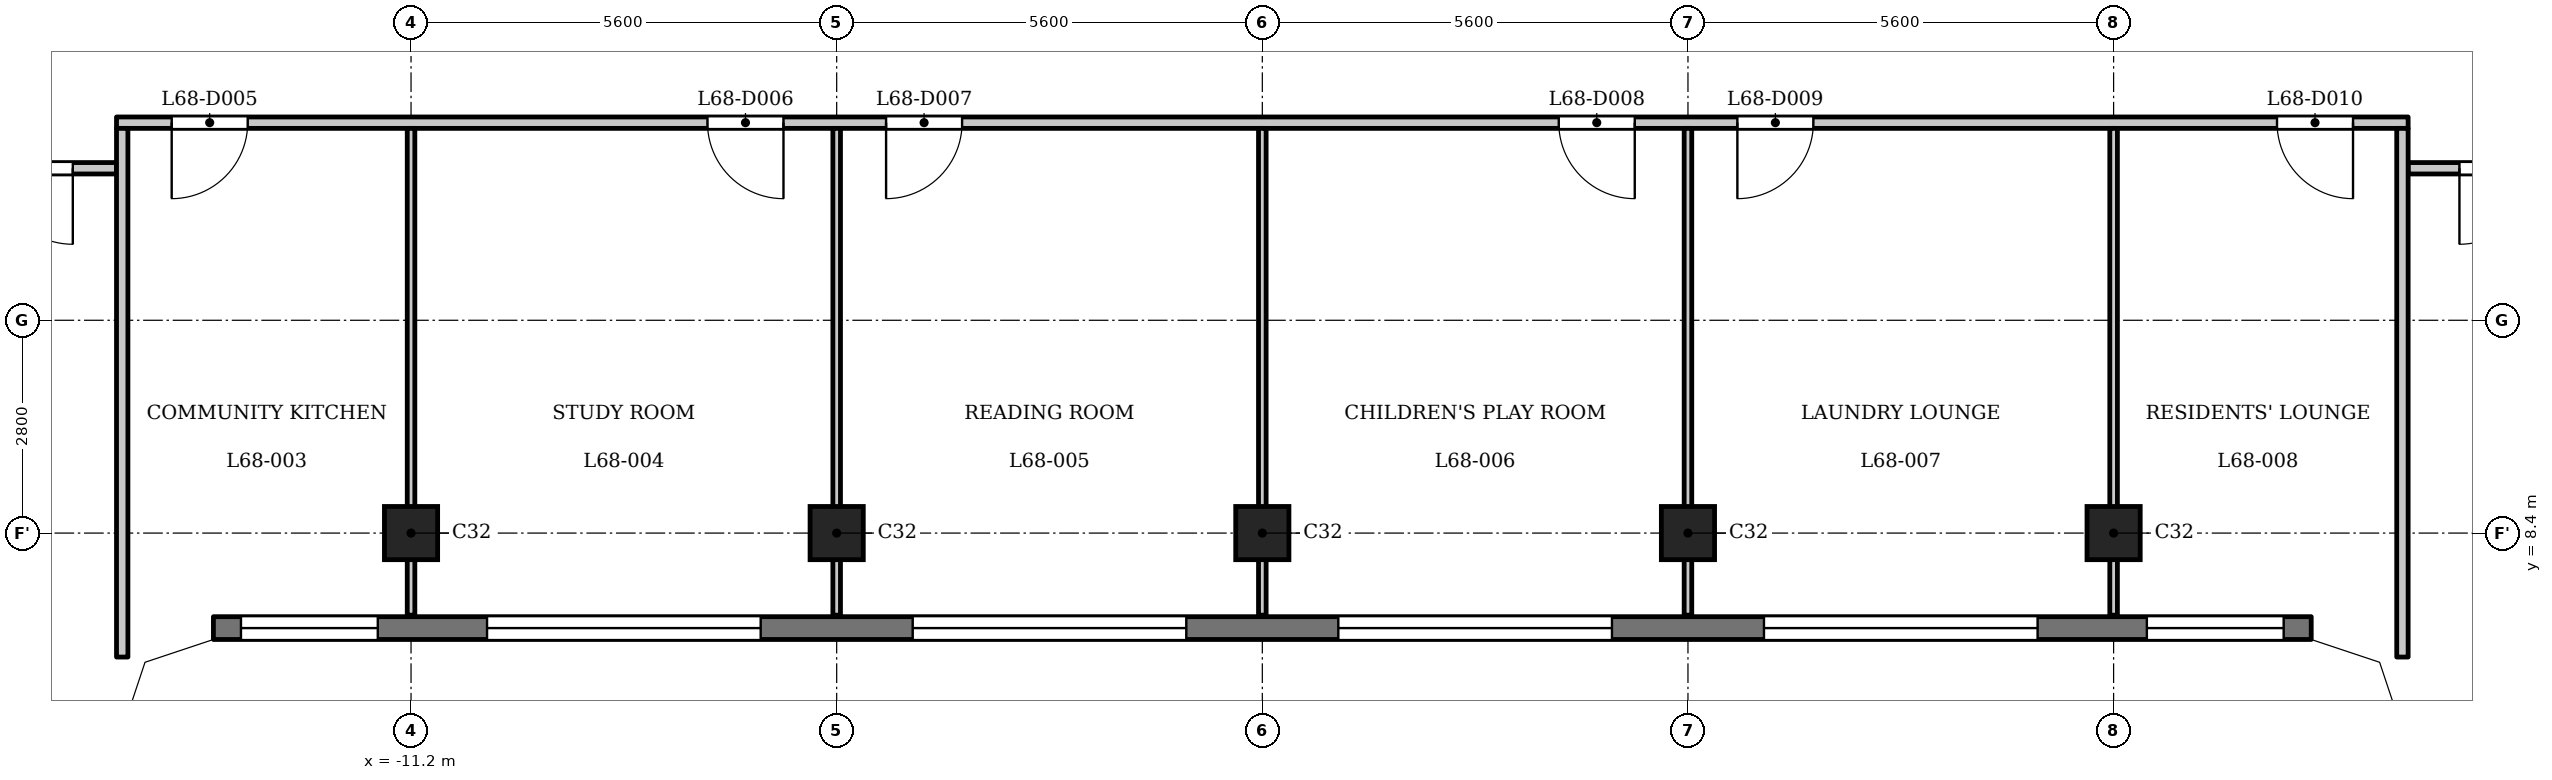
"""IFC4 building model, lengths in metres.
Left out: names, types, materials, properties, quantities, classifications, styles, units other than length and angle.
Written with IfcOpenShell. Run it as: python <this file> out.ifc"""

import sys

from ifc_helpers import new_model, si_unit, direction, frame, frame_2d, origin, origin_2d, place, context, subcontext, project, spatial, polyline, rectangle, outline, extrude, element, fill, save


model = new_model("IFC4")
c1 = context("Model", 3, precision=1e-05, world=origin(), true_north=direction((0.0, 1.0)))
c2 = subcontext(c1, "Body", "Model", "MODEL_VIEW")
j1 = project(units=[si_unit("LENGTHUNIT", "METRE"), si_unit("PLANEANGLEUNIT", "RADIAN")], contexts=[c1])
p1 = place(None, origin())
s1 = spatial("IfcSite", under=j1, at=p1, CompositionType="ELEMENT")
p2 = place(p1, origin())
s2 = spatial("IfcBuilding", under=s1, at=p2, CompositionType="ELEMENT")
p3 = place(p2, frame((0.0, 0.0, 262.7)))
s3 = spatial("IfcBuildingStorey", under=s2, at=p3, CompositionType="ELEMENT", Elevation=262.7)
for number, where, z_axis, x_axis in (
    (1, (-11.2, 8.4, 0.0), (0.0, 0.0, 1.0), (1.0, 0.0, 0.0)),
    (2, (-5.6, 8.4, 0.0), (0.0, 0.0, 1.0), (1.0, 0.0, 0.0)),
    (3, (0.0, 8.4, 0.0), (0.0, 0.0, 1.0), (1.0, 0.0, 0.0)),
    (4, (5.6, 8.4, 0.0), (0.0, 0.0, 1.0), (1.0, 0.0, 0.0)),
    (5, (11.2, 8.4, 0.0), (0.0, 0.0, 1.0), (1.0, 0.0, 0.0)),
):
    element("IfcColumn", number, at=place(p3, frame(where, z_axis=z_axis, x_axis=x_axis)), inside=s3, PredefinedType="COLUMN", context=c2, shape_type="SweptSolid", body=[
        extrude(rectangle(XDim=0.7, YDim=0.7, at=origin_2d()), origin(), (0.0, 0.0, 1.0), 3.5),
    ])
p4 = place(p3, frame((-13.8, 7.15, 0.0), z_axis=(0.0, 0.0, 1.0), x_axis=(1.0, 0.0, 0.0)))
e6 = element("IfcWall", 6, at=p4, inside=s3, PredefinedType="SOLIDWALL", context=c2, shape_type="SweptSolid", body=[
    extrude(rectangle(XDim=27.6, YDim=0.3, at=frame_2d((13.8, 0.0))), origin(), (0.0, 0.0, 1.0), 3.2),
])
p5 = place(p4, frame((0.363, 0.0, 0.9)))
e7 = element("IfcOpeningElement", 7, at=p5, cuts=e6, PredefinedType="OPENING", context=c2, shape_type="SweptSolid", body=[
    extrude(rectangle(XDim=1.8, YDim=1.25, at=frame_2d((0.9, 0.625))), frame((0.0, 0.16, 0.0), z_axis=(0.0, -1.0, 0.0), x_axis=(1.0, 0.0, 0.0)), (0.0, 0.0, 1.0), 0.32),
])
p6 = place(p4, frame((3.6, 0.0, 1.2)))
e8 = element("IfcOpeningElement", 8, at=p6, cuts=e6, PredefinedType="OPENING", context=c2, shape_type="SweptSolid", body=[
    extrude(rectangle(XDim=3.6, YDim=0.95, at=frame_2d((1.8, 0.475))), frame((0.0, 0.16, 0.0), z_axis=(0.0, -1.0, 0.0), x_axis=(1.0, 0.0, 0.0)), (0.0, 0.0, 1.0), 0.32),
])
p7 = place(p4, frame((9.2, 0.0, 1.2)))
e9 = element("IfcOpeningElement", 9, at=p7, cuts=e6, PredefinedType="OPENING", context=c2, shape_type="SweptSolid", body=[
    extrude(rectangle(XDim=3.6, YDim=0.95, at=frame_2d((1.8, 0.475))), frame((0.0, 0.16, 0.0), z_axis=(0.0, -1.0, 0.0), x_axis=(1.0, 0.0, 0.0)), (0.0, 0.0, 1.0), 0.32),
])
p8 = place(p4, frame((14.8, 0.0, 1.2)))
e10 = element("IfcOpeningElement", 10, at=p8, cuts=e6, PredefinedType="OPENING", context=c2, shape_type="SweptSolid", body=[
    extrude(rectangle(XDim=3.6, YDim=0.95, at=frame_2d((1.8, 0.475))), frame((0.0, 0.16, 0.0), z_axis=(0.0, -1.0, 0.0), x_axis=(1.0, 0.0, 0.0)), (0.0, 0.0, 1.0), 0.32),
])
p9 = place(p4, frame((20.4, 0.0, 1.2)))
e11 = element("IfcOpeningElement", 11, at=p9, cuts=e6, PredefinedType="OPENING", context=c2, shape_type="SweptSolid", body=[
    extrude(rectangle(XDim=3.6, YDim=0.95, at=frame_2d((1.8, 0.475))), frame((0.0, 0.16, 0.0), z_axis=(0.0, -1.0, 0.0), x_axis=(1.0, 0.0, 0.0)), (0.0, 0.0, 1.0), 0.32),
])
p10 = place(p4, frame((25.438, 0.0, 0.9)))
e12 = element("IfcOpeningElement", 12, at=p10, cuts=e6, PredefinedType="OPENING", context=c2, shape_type="SweptSolid", body=[
    extrude(rectangle(XDim=1.8, YDim=1.25, at=frame_2d((0.9, 0.625))), frame((0.0, 0.16, 0.0), z_axis=(0.0, -1.0, 0.0), x_axis=(1.0, 0.0, 0.0)), (0.0, 0.0, 1.0), 0.32),
])
p11 = place(p3, frame((-17.4, 13.2, 0.0), z_axis=(0.0, 0.0, 1.0), x_axis=(1.0, 0.0, 0.0)))
e13 = element("IfcWall", 13, at=p11, inside=s3, PredefinedType="PARTITIONING", context=c2, shape_type="SweptSolid", body=[
    extrude(rectangle(XDim=2.325, YDim=0.15, at=frame_2d((1.163, 0.0))), origin(), (0.0, 0.0, 1.0), 3.2),
])
p12 = place(p11, frame((0.75, 0.0, 0.0)))
e14 = element("IfcOpeningElement", 14, at=p12, cuts=e13, PredefinedType="OPENING", context=c2, shape_type="SweptSolid", body=[
    extrude(rectangle(XDim=1.0, YDim=2.1, at=frame_2d((0.5, 1.05))), frame((0.0, 0.085, 0.0), z_axis=(0.0, -1.0, 0.0), x_axis=(1.0, 0.0, 0.0)), (0.0, 0.0, 1.0), 0.17),
])
p13 = place(p3, frame((15.075, 13.2, 0.0), z_axis=(0.0, 0.0, 1.0), x_axis=(1.0, 0.0, 0.0)))
e15 = element("IfcWall", 15, at=p13, inside=s3, PredefinedType="PARTITIONING", context=c2, shape_type="SweptSolid", body=[
    extrude(rectangle(XDim=2.325, YDim=0.15, at=frame_2d((1.163, 0.0))), origin(), (0.0, 0.0, 1.0), 3.2),
])
p14 = place(p13, frame((0.675, 0.0, 0.0)))
e16 = element("IfcOpeningElement", 16, at=p14, cuts=e15, PredefinedType="OPENING", context=c2, shape_type="SweptSolid", body=[
    extrude(rectangle(XDim=1.0, YDim=2.1, at=frame_2d((0.5, 1.05))), frame((0.0, 0.085, 0.0), z_axis=(0.0, -1.0, 0.0), x_axis=(1.0, 0.0, 0.0)), (0.0, 0.0, 1.0), 0.17),
])
p15 = place(p3, frame((-15.075, 13.8, 0.0), z_axis=(0.0, 0.0, 1.0), x_axis=(1.0, 0.0, 0.0)))
e17 = element("IfcWall", 17, at=p15, inside=s3, PredefinedType="PARTITIONING", context=c2, shape_type="SweptSolid", body=[
    extrude(rectangle(XDim=30.15, YDim=0.15, at=frame_2d((15.075, 0.0))), origin(), (0.0, 0.0, 1.0), 3.2),
])
p16 = place(p15, frame((0.726, 0.0, 0.0)))
e18 = element("IfcOpeningElement", 18, at=p16, cuts=e17, PredefinedType="OPENING", context=c2, shape_type="SweptSolid", body=[
    extrude(rectangle(XDim=1.0, YDim=2.1, at=frame_2d((0.5, 1.05))), frame((0.0, 0.085, 0.0), z_axis=(0.0, -1.0, 0.0), x_axis=(1.0, 0.0, 0.0)), (0.0, 0.0, 1.0), 0.17),
])
p17 = place(p15, frame((7.775, 0.0, 0.0)))
e19 = element("IfcOpeningElement", 19, at=p17, cuts=e17, PredefinedType="OPENING", context=c2, shape_type="SweptSolid", body=[
    extrude(rectangle(XDim=1.0, YDim=2.1, at=frame_2d((0.5, 1.05))), frame((0.0, 0.085, 0.0), z_axis=(0.0, -1.0, 0.0), x_axis=(1.0, 0.0, 0.0)), (0.0, 0.0, 1.0), 0.17),
])
p18 = place(p15, frame((10.125, 0.0, 0.0)))
e20 = element("IfcOpeningElement", 20, at=p18, cuts=e17, PredefinedType="OPENING", context=c2, shape_type="SweptSolid", body=[
    extrude(rectangle(XDim=1.0, YDim=2.1, at=frame_2d((0.5, 1.05))), frame((0.0, 0.085, 0.0), z_axis=(0.0, -1.0, 0.0), x_axis=(1.0, 0.0, 0.0)), (0.0, 0.0, 1.0), 0.17),
])
p19 = place(p15, frame((18.975, 0.0, 0.0)))
e21 = element("IfcOpeningElement", 21, at=p19, cuts=e17, PredefinedType="OPENING", context=c2, shape_type="SweptSolid", body=[
    extrude(rectangle(XDim=1.0, YDim=2.1, at=frame_2d((0.5, 1.05))), frame((0.0, 0.085, 0.0), z_axis=(0.0, -1.0, 0.0), x_axis=(1.0, 0.0, 0.0)), (0.0, 0.0, 1.0), 0.17),
])
p20 = place(p15, frame((21.325, 0.0, 0.0)))
e22 = element("IfcOpeningElement", 22, at=p20, cuts=e17, PredefinedType="OPENING", context=c2, shape_type="SweptSolid", body=[
    extrude(rectangle(XDim=1.0, YDim=2.1, at=frame_2d((0.5, 1.05))), frame((0.0, 0.085, 0.0), z_axis=(0.0, -1.0, 0.0), x_axis=(1.0, 0.0, 0.0)), (0.0, 0.0, 1.0), 0.17),
])
p21 = place(p15, frame((28.425, 0.0, 0.0)))
e23 = element("IfcOpeningElement", 23, at=p21, cuts=e17, PredefinedType="OPENING", context=c2, shape_type="SweptSolid", body=[
    extrude(rectangle(XDim=1.0, YDim=2.1, at=frame_2d((0.5, 1.05))), frame((0.0, 0.085, 0.0), z_axis=(0.0, -1.0, 0.0), x_axis=(1.0, 0.0, 0.0)), (0.0, 0.0, 1.0), 0.17),
])
p22 = place(p3, frame((-15.0, 6.769, 0.0), z_axis=(0.0, 0.0, 1.0), x_axis=(0.0, 1.0, 0.0)))
e24 = element("IfcWall", 24, at=p22, inside=s3, PredefinedType="PARTITIONING", context=c2, shape_type="SweptSolid", body=[
    extrude(rectangle(XDim=6.956, YDim=0.15, at=frame_2d((3.478, 0.0))), origin(), (0.0, 0.0, 1.0), 3.2),
])
for number, where, z_axis, x_axis in (
    (25, (-11.2, 7.32, 0.0), (0.0, 0.0, 1.0), (0.0, 1.0, 0.0)),
    (26, (-5.6, 7.32, 0.0), (0.0, 0.0, 1.0), (0.0, 1.0, 0.0)),
    (27, (0.0, 7.32, 0.0), (0.0, 0.0, 1.0), (0.0, 1.0, 0.0)),
    (28, (5.6, 7.32, 0.0), (0.0, 0.0, 1.0), (0.0, 1.0, 0.0)),
    (29, (11.2, 7.32, 0.0), (0.0, 0.0, 1.0), (0.0, 1.0, 0.0)),
):
    element("IfcWall", number, at=place(p3, frame(where, z_axis=z_axis, x_axis=x_axis)), inside=s3, PredefinedType="PARTITIONING", context=c2, shape_type="SweptSolid", body=[
        extrude(rectangle(XDim=6.405, YDim=0.1, at=frame_2d((3.203, 0.0))), origin(), (0.0, 0.0, 1.0), 3.2),
    ])
p23 = place(p3, frame((15.0, 6.769, 0.0), z_axis=(0.0, 0.0, 1.0), x_axis=(0.0, 1.0, 0.0)))
e30 = element("IfcWall", 30, at=p23, inside=s3, PredefinedType="PARTITIONING", context=c2, shape_type="SweptSolid", body=[
    extrude(rectangle(XDim=6.956, YDim=0.15, at=frame_2d((3.478, 0.0))), origin(), (0.0, 0.0, 1.0), 3.2),
])
p24 = place(p3, origin())
e31 = element("IfcWall", 31, at=p24, inside=s3, PredefinedType="SOLIDWALL", context=c2, shape_type="SweptSolid", body=[
    extrude(outline(polyline([(-13.849, 7.3), (-14.937, 6.937), (-15.3, 5.849), (-15.3, 5.8), (-15.0, 5.8), (-14.7, 6.7), (-13.8, 7.0), (-13.8, 7.3), (-13.849, 7.3)])), origin(), (0.0, 0.0, 1.0), 3.2),
])
e32 = element("IfcWall", 32, at=p24, inside=s3, PredefinedType="SOLIDWALL", context=c2, shape_type="SweptSolid", body=[
    extrude(outline(polyline([(14.937, 6.937), (13.849, 7.3), (13.8, 7.3), (13.8, 7.0), (14.7, 6.7), (15.0, 5.8), (15.3, 5.8), (15.3, 5.849), (14.937, 6.937)])), origin(), (0.0, 0.0, 1.0), 3.2),
])
p25 = place(p12, origin())
e33 = element("IfcDoor", 33, at=p25, inside=s3, OperationType="SINGLE_SWING_RIGHT", PredefinedType="DOOR", context=c2, shape_type="SweptSolid", body=[
    extrude(rectangle(XDim=1.0, YDim=2.1, at=frame_2d((0.5, 1.05))), frame((0.0, 0.025, 0.0), z_axis=(0.0, -1.0, 0.0), x_axis=(1.0, 0.0, 0.0)), (0.0, 0.0, 1.0), 0.05),
])
fill(e14, e33)
p26 = place(p14, origin())
e34 = element("IfcDoor", 34, at=p26, inside=s3, OperationType="SINGLE_SWING_LEFT", PredefinedType="DOOR", context=c2, shape_type="SweptSolid", body=[
    extrude(rectangle(XDim=1.0, YDim=2.1, at=frame_2d((0.5, 1.05))), frame((0.0, 0.025, 0.0), z_axis=(0.0, -1.0, 0.0), x_axis=(1.0, 0.0, 0.0)), (0.0, 0.0, 1.0), 0.05),
])
fill(e16, e34)
p27 = place(p16, origin())
e35 = element("IfcDoor", 35, at=p27, inside=s3, OperationType="SINGLE_SWING_LEFT", PredefinedType="DOOR", context=c2, shape_type="SweptSolid", body=[
    extrude(rectangle(XDim=1.0, YDim=2.1, at=frame_2d((0.5, 1.05))), frame((0.0, 0.025, 0.0), z_axis=(0.0, -1.0, 0.0), x_axis=(1.0, 0.0, 0.0)), (0.0, 0.0, 1.0), 0.05),
])
fill(e18, e35)
p28 = place(p17, origin())
e36 = element("IfcDoor", 36, at=p28, inside=s3, OperationType="SINGLE_SWING_RIGHT", PredefinedType="DOOR", context=c2, shape_type="SweptSolid", body=[
    extrude(rectangle(XDim=1.0, YDim=2.1, at=frame_2d((0.5, 1.05))), frame((0.0, 0.025, 0.0), z_axis=(0.0, -1.0, 0.0), x_axis=(1.0, 0.0, 0.0)), (0.0, 0.0, 1.0), 0.05),
])
fill(e19, e36)
p29 = place(p18, origin())
e37 = element("IfcDoor", 37, at=p29, inside=s3, OperationType="SINGLE_SWING_LEFT", PredefinedType="DOOR", context=c2, shape_type="SweptSolid", body=[
    extrude(rectangle(XDim=1.0, YDim=2.1, at=frame_2d((0.5, 1.05))), frame((0.0, 0.025, 0.0), z_axis=(0.0, -1.0, 0.0), x_axis=(1.0, 0.0, 0.0)), (0.0, 0.0, 1.0), 0.05),
])
fill(e20, e37)
p30 = place(p19, origin())
e38 = element("IfcDoor", 38, at=p30, inside=s3, OperationType="SINGLE_SWING_RIGHT", PredefinedType="DOOR", context=c2, shape_type="SweptSolid", body=[
    extrude(rectangle(XDim=1.0, YDim=2.1, at=frame_2d((0.5, 1.05))), frame((0.0, 0.025, 0.0), z_axis=(0.0, -1.0, 0.0), x_axis=(1.0, 0.0, 0.0)), (0.0, 0.0, 1.0), 0.05),
])
fill(e21, e38)
p31 = place(p20, origin())
e39 = element("IfcDoor", 39, at=p31, inside=s3, OperationType="SINGLE_SWING_LEFT", PredefinedType="DOOR", context=c2, shape_type="SweptSolid", body=[
    extrude(rectangle(XDim=1.0, YDim=2.1, at=frame_2d((0.5, 1.05))), frame((0.0, 0.025, 0.0), z_axis=(0.0, -1.0, 0.0), x_axis=(1.0, 0.0, 0.0)), (0.0, 0.0, 1.0), 0.05),
])
fill(e22, e39)
p32 = place(p21, origin())
e40 = element("IfcDoor", 40, at=p32, inside=s3, OperationType="SINGLE_SWING_RIGHT", PredefinedType="DOOR", context=c2, shape_type="SweptSolid", body=[
    extrude(rectangle(XDim=1.0, YDim=2.1, at=frame_2d((0.5, 1.05))), frame((0.0, 0.025, 0.0), z_axis=(0.0, -1.0, 0.0), x_axis=(1.0, 0.0, 0.0)), (0.0, 0.0, 1.0), 0.05),
])
fill(e23, e40)
p33 = place(p5, origin())
e41 = element("IfcWindow", 41, at=p33, inside=s3, PartitioningType="SINGLE_PANEL", PredefinedType="WINDOW", context=c2, shape_type="SweptSolid", body=[
    extrude(rectangle(XDim=1.8, YDim=1.25, at=frame_2d((0.9, 0.625))), frame((0.0, 0.03, 0.0), z_axis=(0.0, -1.0, 0.0), x_axis=(1.0, 0.0, 0.0)), (0.0, 0.0, 1.0), 0.06),
])
fill(e7, e41)
p34 = place(p6, origin())
e42 = element("IfcWindow", 42, at=p34, inside=s3, PartitioningType="SINGLE_PANEL", PredefinedType="WINDOW", context=c2, shape_type="SweptSolid", body=[
    extrude(rectangle(XDim=3.6, YDim=0.95, at=frame_2d((1.8, 0.475))), frame((0.0, 0.03, 0.0), z_axis=(0.0, -1.0, 0.0), x_axis=(1.0, 0.0, 0.0)), (0.0, 0.0, 1.0), 0.06),
])
fill(e8, e42)
p35 = place(p7, origin())
e43 = element("IfcWindow", 43, at=p35, inside=s3, PartitioningType="SINGLE_PANEL", PredefinedType="WINDOW", context=c2, shape_type="SweptSolid", body=[
    extrude(rectangle(XDim=3.6, YDim=0.95, at=frame_2d((1.8, 0.475))), frame((0.0, 0.03, 0.0), z_axis=(0.0, -1.0, 0.0), x_axis=(1.0, 0.0, 0.0)), (0.0, 0.0, 1.0), 0.06),
])
fill(e9, e43)
p36 = place(p8, origin())
e44 = element("IfcWindow", 44, at=p36, inside=s3, PartitioningType="SINGLE_PANEL", PredefinedType="WINDOW", context=c2, shape_type="SweptSolid", body=[
    extrude(rectangle(XDim=3.6, YDim=0.95, at=frame_2d((1.8, 0.475))), frame((0.0, 0.03, 0.0), z_axis=(0.0, -1.0, 0.0), x_axis=(1.0, 0.0, 0.0)), (0.0, 0.0, 1.0), 0.06),
])
fill(e10, e44)
p37 = place(p9, origin())
e45 = element("IfcWindow", 45, at=p37, inside=s3, PartitioningType="SINGLE_PANEL", PredefinedType="WINDOW", context=c2, shape_type="SweptSolid", body=[
    extrude(rectangle(XDim=3.6, YDim=0.95, at=frame_2d((1.8, 0.475))), frame((0.0, 0.03, 0.0), z_axis=(0.0, -1.0, 0.0), x_axis=(1.0, 0.0, 0.0)), (0.0, 0.0, 1.0), 0.06),
])
fill(e11, e45)
p38 = place(p10, origin())
e46 = element("IfcWindow", 46, at=p38, inside=s3, PartitioningType="SINGLE_PANEL", PredefinedType="WINDOW", context=c2, shape_type="SweptSolid", body=[
    extrude(rectangle(XDim=1.8, YDim=1.25, at=frame_2d((0.9, 0.625))), frame((0.0, 0.03, 0.0), z_axis=(0.0, -1.0, 0.0), x_axis=(1.0, 0.0, 0.0)), (0.0, 0.0, 1.0), 0.06),
])
fill(e12, e46)
save(model, sys.argv[1])
